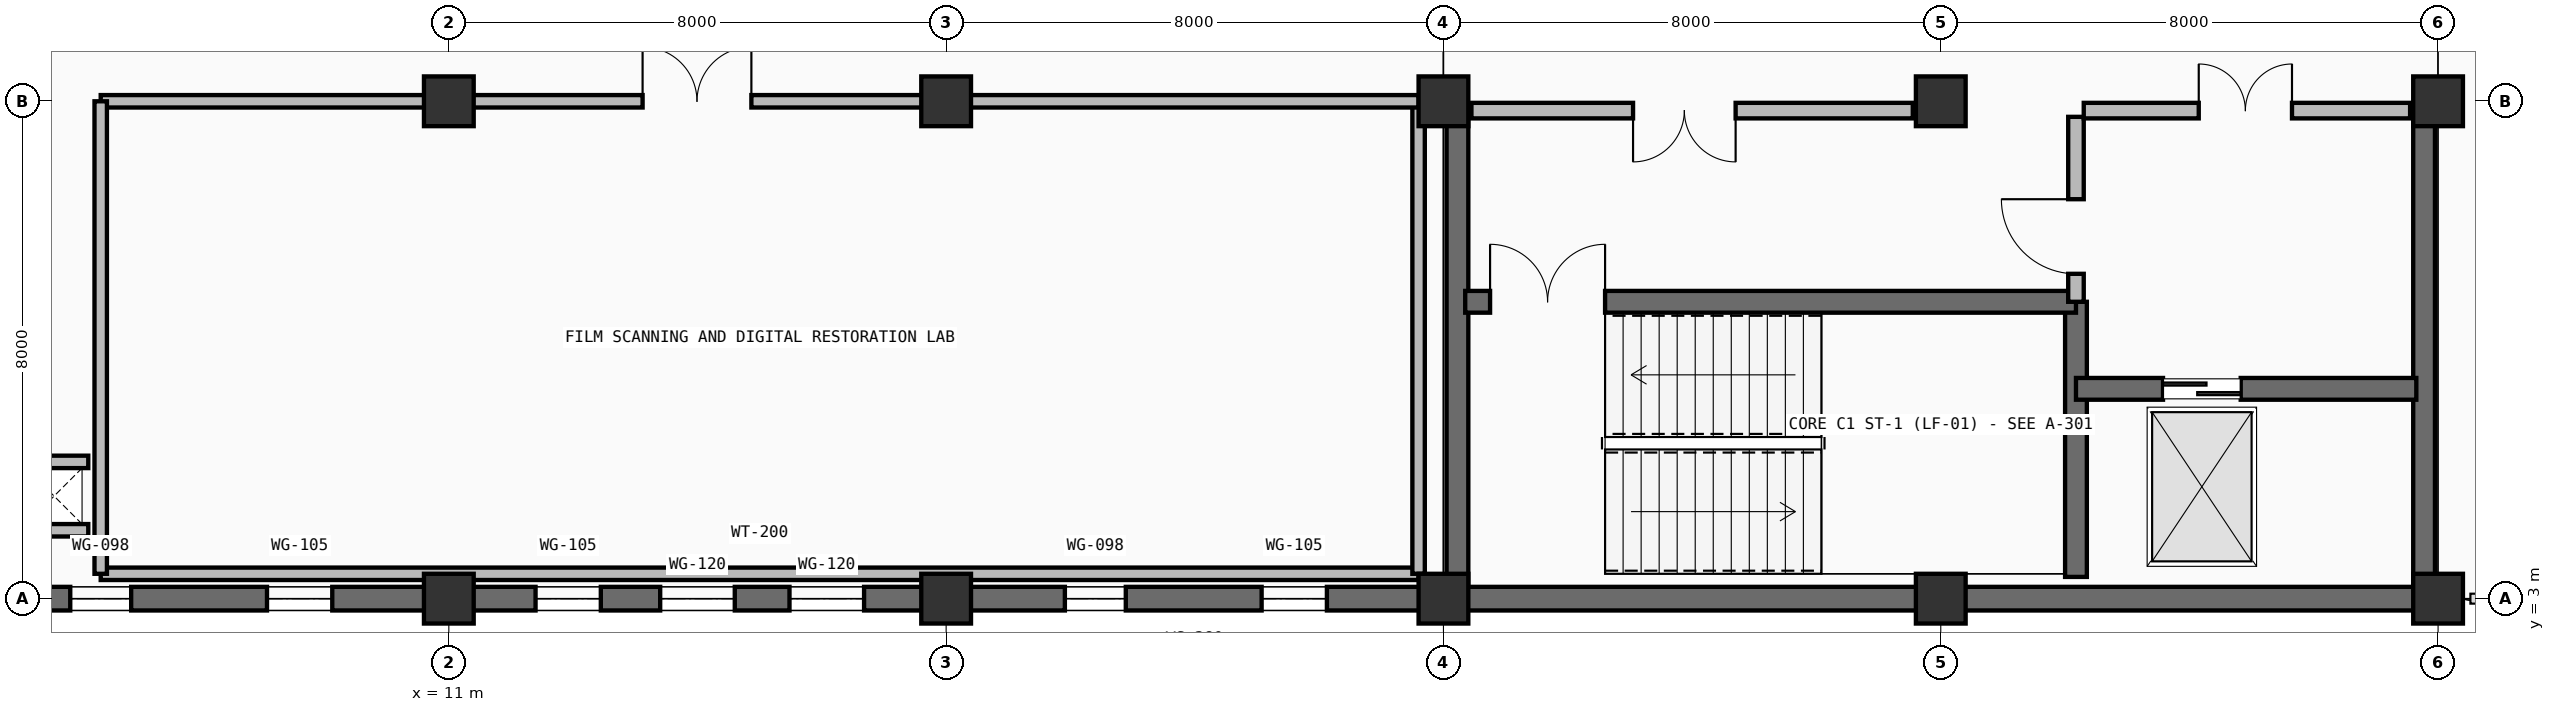
"""IFC4 building model, lengths in metres.
Left out: names, types, materials, properties, quantities, classifications, styles, units other than length and angle.
Written with IfcOpenShell. Run it as: python <this file> out.ifc"""

import sys

from ifc_helpers import new_model, si_unit, direction, frame, frame_2d, origin, origin_2d, place, context, subcontext, project, spatial, rectangle, extrude, element, fill, save


model = new_model("IFC4")
c1 = context("Model", 3, precision=1e-05, world=origin(), true_north=direction((0.0, 1.0)))
c2 = subcontext(c1, "Body", "Model", "MODEL_VIEW")
j1 = project(units=[si_unit("LENGTHUNIT", "METRE"), si_unit("PLANEANGLEUNIT", "RADIAN")], contexts=[c1])
p1 = place(None, origin())
s1 = spatial("IfcSite", under=j1, at=p1, CompositionType="ELEMENT")
p2 = place(p1, origin())
s2 = spatial("IfcBuilding", under=s1, at=p2, CompositionType="ELEMENT")
p3 = place(p2, frame((0.0, 0.0, 9.9)))
s3 = spatial("IfcBuildingStorey", under=s2, at=p3, CompositionType="ELEMENT", Elevation=9.9)
for number, where, z_axis, x_axis in (
    (1, (11.0, 3.0, 0.0), (0.0, 0.0, 1.0), (1.0, 0.0, 0.0)),
    (2, (11.0, 11.0, 0.0), (0.0, 0.0, 1.0), (1.0, 0.0, 0.0)),
    (3, (19.0, 3.0, 0.0), (0.0, 0.0, 1.0), (1.0, 0.0, 0.0)),
    (4, (19.0, 11.0, 0.0), (0.0, 0.0, 1.0), (1.0, 0.0, 0.0)),
    (5, (27.0, 3.0, 0.0), (0.0, 0.0, 1.0), (1.0, 0.0, 0.0)),
    (6, (27.0, 11.0, 0.0), (0.0, 0.0, 1.0), (1.0, 0.0, 0.0)),
    (7, (35.0, 3.0, 0.0), (0.0, 0.0, 1.0), (1.0, 0.0, 0.0)),
    (8, (35.0, 11.0, 0.0), (0.0, 0.0, 1.0), (1.0, 0.0, 0.0)),
    (9, (43.0, 3.0, 0.0), (0.0, 0.0, 1.0), (1.0, 0.0, 0.0)),
    (10, (43.0, 11.0, 0.0), (0.0, 0.0, 1.0), (1.0, 0.0, 0.0)),
):
    element("IfcColumn", number, at=place(p3, frame(where, z_axis=z_axis, x_axis=x_axis)), inside=s3, PredefinedType="COLUMN", context=c2, shape_type="SweptSolid", body=[
        extrude(rectangle(XDim=0.8, YDim=0.8, at=origin_2d()), origin(), (0.0, 0.0, 1.0), 4.5),
    ])
for number, where, z_axis, x_axis in (
    (11, (43.0, 3.0, 0.0), (0.0, 0.0, 1.0), (-1.0, 0.0, 0.0)),
    (12, (35.0, 3.0, 0.0), (0.0, 0.0, 1.0), (-1.0, 0.0, 0.0)),
):
    element("IfcWall", number, at=place(p3, frame(where, z_axis=z_axis, x_axis=x_axis)), inside=s3, PredefinedType="SOLIDWALL", context=c2, shape_type="SweptSolid", body=[
        extrude(rectangle(XDim=8.0, YDim=0.38, at=frame_2d((4.0, 0.0))), origin(), (0.0, 0.0, 1.0), 4.5),
    ])
p4 = place(p3, frame((27.0, 3.0, 0.0), z_axis=(0.0, 0.0, 1.0), x_axis=(-1.0, 0.0, 0.0)))
e13 = element("IfcWall", 13, at=p4, inside=s3, PredefinedType="SOLIDWALL", context=c2, shape_type="SweptSolid", body=[
    extrude(rectangle(XDim=8.0, YDim=0.38, at=frame_2d((4.0, 0.0))), origin(), (0.0, 0.0, 1.0), 4.5),
])
p5 = place(p4, frame((1.875, 0.0, 1.05)))
e14 = element("IfcOpeningElement", 14, at=p5, cuts=e13, PredefinedType="OPENING", context=c2, shape_type="SweptSolid", body=[
    extrude(rectangle(XDim=1.05, YDim=1.7, at=frame_2d((0.525, 0.85))), frame((0.0, 0.2, 0.0), z_axis=(0.0, -1.0, 0.0), x_axis=(1.0, 0.0, 0.0)), (0.0, 0.0, 1.0), 0.4),
])
p6 = place(p4, frame((5.11, 0.0, 1.05)))
e15 = element("IfcOpeningElement", 15, at=p6, cuts=e13, PredefinedType="OPENING", context=c2, shape_type="SweptSolid", body=[
    extrude(rectangle(XDim=0.98, YDim=1.6, at=frame_2d((0.49, 0.8))), frame((0.0, 0.2, 0.0), z_axis=(0.0, -1.0, 0.0), x_axis=(1.0, 0.0, 0.0)), (0.0, 0.0, 1.0), 0.4),
])
p7 = place(p3, frame((19.0, 3.0, 0.0), z_axis=(0.0, 0.0, 1.0), x_axis=(-1.0, 0.0, 0.0)))
e16 = element("IfcWall", 16, at=p7, inside=s3, PredefinedType="SOLIDWALL", context=c2, shape_type="SweptSolid", body=[
    extrude(rectangle(XDim=8.0, YDim=0.38, at=frame_2d((4.0, 0.0))), origin(), (0.0, 0.0, 1.0), 4.5),
])
p8 = place(p7, frame((1.32, 0.0, 1.05)))
e17 = element("IfcOpeningElement", 17, at=p8, cuts=e16, PredefinedType="OPENING", context=c2, shape_type="SweptSolid", body=[
    extrude(rectangle(XDim=1.2, YDim=1.9, at=frame_2d((0.6, 0.95))), frame((0.0, 0.2, 0.0), z_axis=(0.0, -1.0, 0.0), x_axis=(1.0, 0.0, 0.0)), (0.0, 0.0, 1.0), 0.4),
])
p9 = place(p7, frame((3.4, 0.0, 1.05)))
e18 = element("IfcOpeningElement", 18, at=p9, cuts=e16, PredefinedType="OPENING", context=c2, shape_type="SweptSolid", body=[
    extrude(rectangle(XDim=1.2, YDim=1.9, at=frame_2d((0.6, 0.95))), frame((0.0, 0.2, 0.0), z_axis=(0.0, -1.0, 0.0), x_axis=(1.0, 0.0, 0.0)), (0.0, 0.0, 1.0), 0.4),
])
p10 = place(p7, frame((5.555, 0.0, 1.05)))
e19 = element("IfcOpeningElement", 19, at=p10, cuts=e16, PredefinedType="OPENING", context=c2, shape_type="SweptSolid", body=[
    extrude(rectangle(XDim=1.05, YDim=1.7, at=frame_2d((0.525, 0.85))), frame((0.0, 0.2, 0.0), z_axis=(0.0, -1.0, 0.0), x_axis=(1.0, 0.0, 0.0)), (0.0, 0.0, 1.0), 0.4),
])
p11 = place(p3, frame((11.0, 3.0, 0.0), z_axis=(0.0, 0.0, 1.0), x_axis=(-1.0, 0.0, 0.0)))
e20 = element("IfcWall", 20, at=p11, inside=s3, PredefinedType="SOLIDWALL", context=c2, shape_type="SweptSolid", body=[
    extrude(rectangle(XDim=8.0, YDim=0.38, at=frame_2d((4.0, 0.0))), origin(), (0.0, 0.0, 1.0), 4.5),
])
p12 = place(p11, frame((1.875, 0.0, 1.05)))
e21 = element("IfcOpeningElement", 21, at=p12, cuts=e20, PredefinedType="OPENING", context=c2, shape_type="SweptSolid", body=[
    extrude(rectangle(XDim=1.05, YDim=1.7, at=frame_2d((0.525, 0.85))), frame((0.0, 0.2, 0.0), z_axis=(0.0, -1.0, 0.0), x_axis=(1.0, 0.0, 0.0)), (0.0, 0.0, 1.0), 0.4),
])
p13 = place(p11, frame((5.11, 0.0, 1.05)))
e22 = element("IfcOpeningElement", 22, at=p13, cuts=e20, PredefinedType="OPENING", context=c2, shape_type="SweptSolid", body=[
    extrude(rectangle(XDim=0.98, YDim=1.6, at=frame_2d((0.49, 0.8))), frame((0.0, 0.2, 0.0), z_axis=(0.0, -1.0, 0.0), x_axis=(1.0, 0.0, 0.0)), (0.0, 0.0, 1.0), 0.4),
])
p14 = place(p3, frame((27.225, 3.2, 0.0), z_axis=(0.0, 0.0, 1.0), x_axis=(0.0, 1.0, 0.0)))
e23 = element("IfcWall", 23, at=p14, inside=s3, PredefinedType="SHEAR", context=c2, shape_type="SweptSolid", body=[
    extrude(rectangle(XDim=7.6, YDim=0.35, at=frame_2d((3.8, 0.0))), origin(), (0.0, 0.0, 1.0), 4.2),
])
p15 = place(p3, frame((37.175, 3.35, 0.0), z_axis=(0.0, 0.0, 1.0), x_axis=(0.0, 1.0, 0.0)))
e24 = element("IfcWall", 24, at=p15, inside=s3, PredefinedType="SHEAR", context=c2, shape_type="SweptSolid", body=[
    extrude(rectangle(XDim=4.425, YDim=0.35, at=frame_2d((2.212, 0.0))), origin(), (0.0, 0.0, 1.0), 4.2),
])
p16 = place(p3, frame((42.775, 3.2, 0.0), z_axis=(0.0, 0.0, 1.0), x_axis=(0.0, 1.0, 0.0)))
e25 = element("IfcWall", 25, at=p16, inside=s3, PredefinedType="SHEAR", context=c2, shape_type="SweptSolid", body=[
    extrude(rectangle(XDim=7.6, YDim=0.35, at=frame_2d((3.8, 0.0))), origin(), (0.0, 0.0, 1.0), 4.2),
])
p17 = place(p3, frame((27.35, 7.775, 0.0), z_axis=(0.0, 0.0, 1.0), x_axis=(1.0, 0.0, 0.0)))
e26 = element("IfcWall", 26, at=p17, inside=s3, PredefinedType="SHEAR", context=c2, shape_type="SweptSolid", body=[
    extrude(rectangle(XDim=9.825, YDim=0.35, at=frame_2d((4.913, 0.0))), origin(), (0.0, 0.0, 1.0), 4.2),
])
p18 = place(p17, frame((0.4, 0.0, 0.0)))
e27 = element("IfcOpeningElement", 27, at=p18, cuts=e26, PredefinedType="OPENING", context=c2, shape_type="SweptSolid", body=[
    extrude(rectangle(XDim=1.85, YDim=2.25, at=frame_2d((0.925, 1.125))), frame((0.0, 0.185, 0.0), z_axis=(0.0, -1.0, 0.0), x_axis=(1.0, 0.0, 0.0)), (0.0, 0.0, 1.0), 0.37),
])
p19 = place(p3, frame((37.175, 6.375, 0.0), z_axis=(0.0, 0.0, 1.0), x_axis=(1.0, 0.0, 0.0)))
e28 = element("IfcWall", 28, at=p19, inside=s3, PredefinedType="SHEAR", context=c2, shape_type="SweptSolid", body=[
    extrude(rectangle(XDim=5.475, YDim=0.35, at=frame_2d((2.737, 0.0))), origin(), (0.0, 0.0, 1.0), 4.2),
])
p20 = place(p19, frame((1.4, 0.0, 0.0)))
e29 = element("IfcOpeningElement", 29, at=p20, cuts=e28, PredefinedType="OPENING", context=c2, shape_type="SweptSolid", body=[
    extrude(rectangle(XDim=1.25, YDim=2.25, at=frame_2d((0.625, 1.125))), frame((0.0, 0.185, 0.0), z_axis=(0.0, -1.0, 0.0), x_axis=(1.0, 0.0, 0.0)), (0.0, 0.0, 1.0), 0.37),
])
p21 = place(p3, frame((37.175, 7.775, 0.0), z_axis=(0.0, 0.0, 1.0), x_axis=(0.0, 1.0, 0.0)))
e30 = element("IfcWall", 30, at=p21, inside=s3, PredefinedType="PARTITIONING", context=c2, shape_type="SweptSolid", body=[
    extrude(rectangle(XDim=2.975, YDim=0.25, at=frame_2d((1.488, 0.0))), origin(), (0.0, 0.0, 1.0), 4.2),
])
p22 = place(p21, frame((0.45, 0.0, 0.0)))
e31 = element("IfcOpeningElement", 31, at=p22, cuts=e30, PredefinedType="OPENING", context=c2, shape_type="SweptSolid", body=[
    extrude(rectangle(XDim=1.2, YDim=2.2, at=frame_2d((0.6, 1.1))), frame((0.0, 0.135, 0.0), z_axis=(0.0, -1.0, 0.0), x_axis=(1.0, 0.0, 0.0)), (0.0, 0.0, 1.0), 0.27),
])
p23 = place(p3, frame((27.45, 10.85, 0.0), z_axis=(0.0, 0.0, 1.0), x_axis=(1.0, 0.0, 0.0)))
e32 = element("IfcWall", 32, at=p23, inside=s3, PredefinedType="PARTITIONING", context=c2, shape_type="SweptSolid", body=[
    extrude(rectangle(XDim=7.1, YDim=0.25, at=frame_2d((3.55, 0.0))), origin(), (0.0, 0.0, 1.0), 3.535),
])
p24 = place(p23, frame((2.6, 0.0, 0.0)))
e33 = element("IfcOpeningElement", 33, at=p24, cuts=e32, PredefinedType="OPENING", context=c2, shape_type="SweptSolid", body=[
    extrude(rectangle(XDim=1.65, YDim=2.25, at=frame_2d((0.825, 1.125))), frame((0.0, 0.135, 0.0), z_axis=(0.0, -1.0, 0.0), x_axis=(1.0, 0.0, 0.0)), (0.0, 0.0, 1.0), 0.27),
])
p25 = place(p3, frame((37.3, 10.85, 0.0), z_axis=(0.0, 0.0, 1.0), x_axis=(1.0, 0.0, 0.0)))
e34 = element("IfcWall", 34, at=p25, inside=s3, PredefinedType="PARTITIONING", context=c2, shape_type="SweptSolid", body=[
    extrude(rectangle(XDim=5.25, YDim=0.25, at=frame_2d((2.625, 0.0))), origin(), (0.0, 0.0, 1.0), 3.535),
])
p26 = place(p25, frame((1.85, 0.0, 0.0)))
e35 = element("IfcOpeningElement", 35, at=p26, cuts=e34, PredefinedType="OPENING", context=c2, shape_type="SweptSolid", body=[
    extrude(rectangle(XDim=1.5, YDim=2.2, at=frame_2d((0.75, 1.1))), frame((0.0, 0.135, 0.0), z_axis=(0.0, -1.0, 0.0), x_axis=(1.0, 0.0, 0.0)), (0.0, 0.0, 1.0), 0.27),
])
p27 = place(p3, frame((5.4, 3.4, 0.0), z_axis=(0.0, 0.0, 1.0), x_axis=(1.0, 0.0, 0.0)))
e36 = element("IfcWall", 36, at=p27, inside=s3, PredefinedType="PARTITIONING", context=c2, shape_type="SweptSolid", body=[
    extrude(rectangle(XDim=21.2, YDim=0.2, at=frame_2d((10.6, 0.0))), origin(), (0.0, 0.0, 1.0), 3.505),
])
p28 = place(p3, frame((26.6, 3.4, 0.0), z_axis=(0.0, 0.0, 1.0), x_axis=(0.0, 1.0, 0.0)))
e37 = element("IfcWall", 37, at=p28, inside=s3, PredefinedType="PARTITIONING", context=c2, shape_type="SweptSolid", body=[
    extrude(rectangle(XDim=7.6, YDim=0.2, at=frame_2d((3.8, 0.0))), origin(), (0.0, 0.0, 1.0), 3.585),
])
p29 = place(p3, frame((5.4, 11.0, 0.0), z_axis=(0.0, 0.0, 1.0), x_axis=(1.0, 0.0, 0.0)))
e38 = element("IfcWall", 38, at=p29, inside=s3, PredefinedType="PARTITIONING", context=c2, shape_type="SweptSolid", body=[
    extrude(rectangle(XDim=21.2, YDim=0.2, at=frame_2d((10.6, 0.0))), origin(), (0.0, 0.0, 1.0), 3.535),
])
p30 = place(p29, frame((8.717, 0.0, 0.0)))
e39 = element("IfcOpeningElement", 39, at=p30, cuts=e38, PredefinedType="OPENING", context=c2, shape_type="SweptSolid", body=[
    extrude(rectangle(XDim=1.75, YDim=2.28, at=frame_2d((0.875, 1.14))), frame((0.0, 0.11, 0.0), z_axis=(0.0, -1.0, 0.0), x_axis=(1.0, 0.0, 0.0)), (0.0, 0.0, 1.0), 0.22),
])
p31 = place(p3, frame((5.4, 3.4, 0.0), z_axis=(0.0, 0.0, 1.0), x_axis=(0.0, 1.0, 0.0)))
e40 = element("IfcWall", 40, at=p31, inside=s3, PredefinedType="PARTITIONING", context=c2, shape_type="SweptSolid", body=[
    extrude(rectangle(XDim=7.6, YDim=0.2, at=frame_2d((3.8, 0.0))), origin(), (0.0, 0.0, 1.0), 4.2),
])
for number, where, z_axis, x_axis in (
    (41, (4.1, 4.1, 0.0), (0.0, 0.0, 1.0), (1.0, 0.0, 0.0)),
    (42, (4.1, 5.2, 0.0), (0.0, 0.0, 1.0), (1.0, 0.0, 0.0)),
):
    element("IfcWall", number, at=place(p3, frame(where, z_axis=z_axis, x_axis=x_axis)), inside=s3, PredefinedType="PARTITIONING", context=c2, shape_type="SweptSolid", body=[
        extrude(rectangle(XDim=1.1, YDim=0.2, at=frame_2d((0.55, 0.0))), origin(), (0.0, 0.0, 1.0), 4.2),
    ])
p32 = place(p5, origin())
e43 = element("IfcWindow", 43, at=p32, inside=s3, PartitioningType="SINGLE_PANEL", PredefinedType="WINDOW", context=c2, shape_type="SweptSolid", body=[
    extrude(rectangle(XDim=1.05, YDim=1.7, at=frame_2d((0.525, 0.85))), frame((0.0, 0.03, 0.0), z_axis=(0.0, -1.0, 0.0), x_axis=(1.0, 0.0, 0.0)), (0.0, 0.0, 1.0), 0.06),
])
fill(e14, e43)
p33 = place(p6, origin())
e44 = element("IfcWindow", 44, at=p33, inside=s3, PartitioningType="SINGLE_PANEL", PredefinedType="WINDOW", context=c2, shape_type="SweptSolid", body=[
    extrude(rectangle(XDim=0.98, YDim=1.6, at=frame_2d((0.49, 0.8))), frame((0.0, 0.03, 0.0), z_axis=(0.0, -1.0, 0.0), x_axis=(1.0, 0.0, 0.0)), (0.0, 0.0, 1.0), 0.06),
])
fill(e15, e44)
p34 = place(p8, origin())
e45 = element("IfcWindow", 45, at=p34, inside=s3, PartitioningType="SINGLE_PANEL", PredefinedType="WINDOW", context=c2, shape_type="SweptSolid", body=[
    extrude(rectangle(XDim=1.2, YDim=1.9, at=frame_2d((0.6, 0.95))), frame((0.0, 0.03, 0.0), z_axis=(0.0, -1.0, 0.0), x_axis=(1.0, 0.0, 0.0)), (0.0, 0.0, 1.0), 0.06),
])
fill(e17, e45)
p35 = place(p9, origin())
e46 = element("IfcWindow", 46, at=p35, inside=s3, PartitioningType="SINGLE_PANEL", PredefinedType="WINDOW", context=c2, shape_type="SweptSolid", body=[
    extrude(rectangle(XDim=1.2, YDim=1.9, at=frame_2d((0.6, 0.95))), frame((0.0, 0.03, 0.0), z_axis=(0.0, -1.0, 0.0), x_axis=(1.0, 0.0, 0.0)), (0.0, 0.0, 1.0), 0.06),
])
fill(e18, e46)
p36 = place(p10, origin())
e47 = element("IfcWindow", 47, at=p36, inside=s3, PartitioningType="SINGLE_PANEL", PredefinedType="WINDOW", context=c2, shape_type="SweptSolid", body=[
    extrude(rectangle(XDim=1.05, YDim=1.7, at=frame_2d((0.525, 0.85))), frame((0.0, 0.03, 0.0), z_axis=(0.0, -1.0, 0.0), x_axis=(1.0, 0.0, 0.0)), (0.0, 0.0, 1.0), 0.06),
])
fill(e19, e47)
p37 = place(p12, origin())
e48 = element("IfcWindow", 48, at=p37, inside=s3, PartitioningType="SINGLE_PANEL", PredefinedType="WINDOW", context=c2, shape_type="SweptSolid", body=[
    extrude(rectangle(XDim=1.05, YDim=1.7, at=frame_2d((0.525, 0.85))), frame((0.0, 0.03, 0.0), z_axis=(0.0, -1.0, 0.0), x_axis=(1.0, 0.0, 0.0)), (0.0, 0.0, 1.0), 0.06),
])
fill(e21, e48)
p38 = place(p13, origin())
e49 = element("IfcWindow", 49, at=p38, inside=s3, PartitioningType="SINGLE_PANEL", PredefinedType="WINDOW", context=c2, shape_type="SweptSolid", body=[
    extrude(rectangle(XDim=0.98, YDim=1.6, at=frame_2d((0.49, 0.8))), frame((0.0, 0.03, 0.0), z_axis=(0.0, -1.0, 0.0), x_axis=(1.0, 0.0, 0.0)), (0.0, 0.0, 1.0), 0.06),
])
fill(e22, e49)
p39 = place(p18, origin())
e50 = element("IfcDoor", 50, at=p39, inside=s3, OperationType="DOUBLE_DOOR_SINGLE_SWING", PredefinedType="DOOR", context=c2, shape_type="SweptSolid", body=[
    extrude(rectangle(XDim=1.85, YDim=2.25, at=frame_2d((0.925, 1.125))), frame((0.0, 0.025, 0.0), z_axis=(0.0, -1.0, 0.0), x_axis=(1.0, 0.0, 0.0)), (0.0, 0.0, 1.0), 0.05),
])
fill(e27, e50)
p40 = place(p20, origin())
e51 = element("IfcDoor", 51, at=p40, inside=s3, OperationType="DOUBLE_DOOR_SLIDING", PredefinedType="DOOR", context=c2, shape_type="SweptSolid", body=[
    extrude(rectangle(XDim=1.25, YDim=2.25, at=frame_2d((0.625, 1.125))), frame((0.0, 0.025, 0.0), z_axis=(0.0, -1.0, 0.0), x_axis=(1.0, 0.0, 0.0)), (0.0, 0.0, 1.0), 0.05),
])
fill(e29, e51)
p41 = place(p22, origin())
e52 = element("IfcDoor", 52, at=p41, inside=s3, OperationType="SINGLE_SWING_RIGHT", PredefinedType="DOOR", context=c2, shape_type="SweptSolid", body=[
    extrude(rectangle(XDim=1.2, YDim=2.2, at=frame_2d((0.6, 1.1))), frame((0.0, 0.025, 0.0), z_axis=(0.0, -1.0, 0.0), x_axis=(1.0, 0.0, 0.0)), (0.0, 0.0, 1.0), 0.05),
])
fill(e31, e52)
p42 = place(p24, frame((1.65, 0.0, 0.0), z_axis=(0.0, 0.0, 1.0), x_axis=(-1.0, 0.0, 0.0)))
e53 = element("IfcDoor", 53, at=p42, inside=s3, OperationType="DOUBLE_DOOR_SINGLE_SWING", PredefinedType="DOOR", context=c2, shape_type="SweptSolid", body=[
    extrude(rectangle(XDim=1.65, YDim=2.25, at=frame_2d((0.825, 1.125))), frame((0.0, 0.025, 0.0), z_axis=(0.0, -1.0, 0.0), x_axis=(1.0, 0.0, 0.0)), (0.0, 0.0, 1.0), 0.05),
])
fill(e33, e53)
p43 = place(p26, origin())
e54 = element("IfcDoor", 54, at=p43, inside=s3, OperationType="DOUBLE_DOOR_SINGLE_SWING", PredefinedType="DOOR", context=c2, shape_type="SweptSolid", body=[
    extrude(rectangle(XDim=1.5, YDim=2.2, at=frame_2d((0.75, 1.1))), frame((0.0, 0.025, 0.0), z_axis=(0.0, -1.0, 0.0), x_axis=(1.0, 0.0, 0.0)), (0.0, 0.0, 1.0), 0.05),
])
fill(e35, e54)
p44 = place(p30, origin())
e55 = element("IfcDoor", 55, at=p44, inside=s3, OperationType="DOUBLE_DOOR_SINGLE_SWING", PredefinedType="DOOR", context=c2, shape_type="SweptSolid", body=[
    extrude(rectangle(XDim=1.75, YDim=2.28, at=frame_2d((0.875, 1.14))), frame((0.0, 0.025, 0.0), z_axis=(0.0, -1.0, 0.0), x_axis=(1.0, 0.0, 0.0)), (0.0, 0.0, 1.0), 0.05),
])
fill(e39, e55)
save(model, sys.argv[1])
